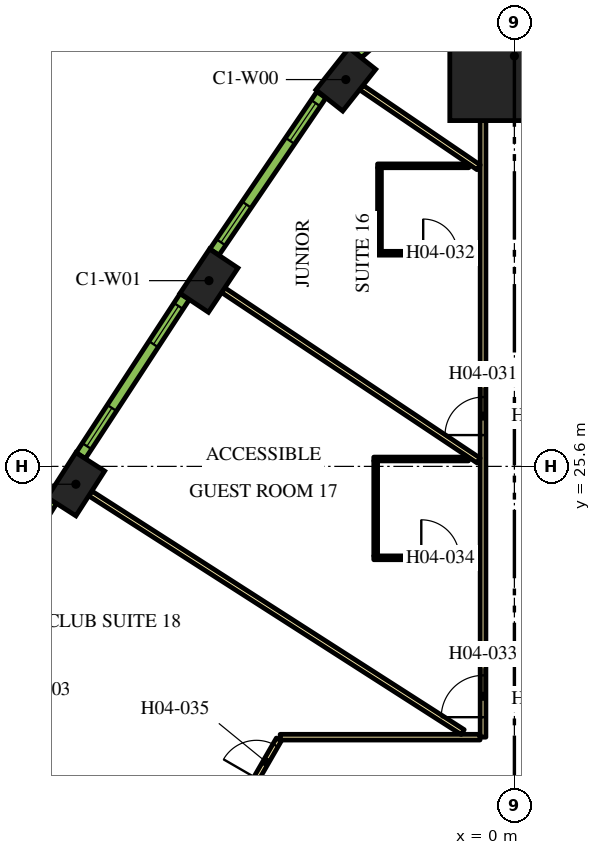
"""IFC4 building model, lengths in metres.
Left out: names, types, materials, properties, quantities, classifications, styles, units other than length and angle.
Written with IfcOpenShell. Run it as: python <this file> out.ifc"""

import sys

from ifc_helpers import new_model, si_unit, direction, frame, frame_2d, origin, origin_2d, place, context, subcontext, project, spatial, rectangle, extrude, element, fill, save


model = new_model("IFC4")
c1 = context("Model", 3, precision=1e-05, world=origin(), true_north=direction((0.0, 1.0)))
c2 = subcontext(c1, "Body", "Model", "MODEL_VIEW")
j1 = project(units=[si_unit("LENGTHUNIT", "METRE"), si_unit("PLANEANGLEUNIT", "RADIAN")], contexts=[c1])
p1 = place(None, origin())
s1 = spatial("IfcSite", under=j1, at=p1, CompositionType="ELEMENT")
p2 = place(p1, origin())
s2 = spatial("IfcBuilding", under=s1, at=p2, CompositionType="ELEMENT")
p3 = place(p2, frame((0.0, 0.0, 62.7)))
s3 = spatial("IfcBuildingStorey", under=s2, at=p3, CompositionType="ELEMENT", Elevation=62.7)
p4 = place(p3, frame((0.0, 36.399, 0.0), z_axis=(0.0, 0.0, 1.0), x_axis=(0.0, 1.0, 0.0)))
e1 = element("IfcColumn", 1, at=p4, inside=s3, PredefinedType="COLUMN", context=c2, shape_type="SweptSolid", body=[
    extrude(rectangle(XDim=3.4, YDim=3.4, at=origin_2d()), origin(), (0.0, 0.0, 1.0), 3.9),
])
for number, where, z_axis, x_axis in (
    (2, (-4.436, 35.778, 0.0), (0.0, 0.0, 1.0), (-0.62, -0.784, 0.0)),
    (3, (-8.037, 30.487, 0.0), (0.0, 0.0, 1.0), (-0.555, -0.832, 0.0)),
    (4, (-11.539, 25.131, 0.0), (0.0, 0.0, 1.0), (-0.539, -0.842, 0.0)),
):
    element("IfcColumn", number, at=place(p3, frame(where, z_axis=z_axis, x_axis=x_axis)), inside=s3, PredefinedType="COLUMN", context=c2, shape_type="SweptSolid", body=[
        extrude(rectangle(XDim=1.4, YDim=0.9, at=origin_2d()), origin(), (0.0, 0.0, 1.0), 3.9),
    ])
p5 = place(p3, frame((-0.825, 18.475, 0.0), z_axis=(0.0, 0.0, 1.0), x_axis=(0.0, 1.0, 0.0)))
e5 = element("IfcWall", 5, at=p5, inside=s3, PredefinedType="PARTITIONING", context=c2, shape_type="SweptSolid", body=[
    extrude(rectangle(XDim=16.224, YDim=0.15, at=frame_2d((8.112, 0.0))), origin(), (0.0, 0.0, 1.0), 2.75),
])
p6 = place(p5, frame((7.949, 0.0, 0.0)))
e6 = element("IfcOpeningElement", 6, at=p6, cuts=e5, PredefinedType="OPENING", context=c2, shape_type="SweptSolid", body=[
    extrude(rectangle(XDim=1.0, YDim=2.1, at=frame_2d((0.5, 1.05))), frame((0.0, 0.085, 0.0), z_axis=(0.0, -1.0, 0.0), x_axis=(1.0, 0.0, 0.0)), (0.0, 0.0, 1.0), 0.17),
])
p7 = place(p5, frame((0.526, 0.0, 0.0)))
e7 = element("IfcOpeningElement", 7, at=p7, cuts=e5, PredefinedType="OPENING", context=c2, shape_type="SweptSolid", body=[
    extrude(rectangle(XDim=1.1, YDim=2.1, at=frame_2d((0.55, 1.05))), frame((0.0, 0.085, 0.0), z_axis=(0.0, -1.0, 0.0), x_axis=(1.0, 0.0, 0.0)), (0.0, 0.0, 1.0), 0.17),
])
p8 = place(p3, frame((-6.163, 18.475, 0.0), z_axis=(0.0, 0.0, 1.0), x_axis=(1.0, 0.0, 0.0)))
e8 = element("IfcWall", 8, at=p8, inside=s3, PredefinedType="PARTITIONING", context=c2, shape_type="SweptSolid", body=[
    extrude(rectangle(XDim=5.258, YDim=0.15, at=frame_2d((2.629, 0.0))), origin(), (0.0, 0.0, 1.0), 2.75),
])
p9 = place(p3, frame((-19.081, -3.9, 0.0), z_axis=(0.0, 0.0, 1.0), x_axis=(0.499998313975, 0.866026377209, 0.0)))
e9 = element("IfcWall", 9, at=p9, inside=s3, PredefinedType="PARTITIONING", context=c2, shape_type="SweptSolid", body=[
    extrude(rectangle(XDim=25.766, YDim=0.15, at=frame_2d((12.883, 0.0))), origin(), (0.0, 0.0, 1.0), 2.75),
])
p10 = place(p9, frame((24.586, 0.0, 0.0)))
e10 = element("IfcOpeningElement", 10, at=p10, cuts=e9, PredefinedType="OPENING", context=c2, shape_type="SweptSolid", body=[
    extrude(rectangle(XDim=1.0, YDim=2.1, at=frame_2d((0.5, 1.05))), frame((0.0, 0.085, 0.0), z_axis=(0.0, -1.0, 0.0), x_axis=(1.0, 0.0, 0.0)), (0.0, 0.0, 1.0), 0.17),
])
p11 = place(p9, frame((9.948, 0.0, 0.0)))
e11 = element("IfcOpeningElement", 11, at=p11, cuts=e9, PredefinedType="OPENING", context=c2, shape_type="SweptSolid", body=[
    extrude(rectangle(XDim=1.0, YDim=2.1, at=frame_2d((0.5, 1.05))), frame((0.0, 0.085, 0.0), z_axis=(0.0, -1.0, 0.0), x_axis=(1.0, 0.0, 0.0)), (0.0, 0.0, 1.0), 0.17),
])
p12 = place(p9, frame((7.782, 0.0, 0.0)))
e12 = element("IfcOpeningElement", 12, at=p12, cuts=e9, PredefinedType="OPENING", context=c2, shape_type="SweptSolid", body=[
    extrude(rectangle(XDim=0.9, YDim=2.1, at=frame_2d((0.45, 1.05))), frame((0.0, 0.085, 0.0), z_axis=(0.0, -1.0, 0.0), x_axis=(1.0, 0.0, 0.0)), (0.0, 0.0, 1.0), 0.17),
])
p13 = place(p9, frame((4.658, 0.0, 0.0)))
e13 = element("IfcOpeningElement", 13, at=p13, cuts=e9, PredefinedType="OPENING", context=c2, shape_type="SweptSolid", body=[
    extrude(rectangle(XDim=0.9, YDim=2.1, at=frame_2d((0.45, 1.05))), frame((0.0, 0.085, 0.0), z_axis=(0.0, -1.0, 0.0), x_axis=(1.0, 0.0, 0.0)), (0.0, 0.0, 1.0), 0.17),
])
p14 = place(p3, frame((-11.16, 24.888, 0.0), z_axis=(0.0, 0.0, 1.0), x_axis=(0.84199813156, -0.539480441211, 0.0)))
e14 = element("IfcWall", 14, at=p14, inside=s3, PredefinedType="PARTITIONING", context=c2, shape_type="SweptSolid", body=[
    extrude(rectangle(XDim=11.638, YDim=0.15, at=frame_2d((5.819, 0.0))), origin(), (0.0, 0.0, 1.0), 2.75),
])
p15 = place(p3, frame((-7.662, 30.238, 0.0), z_axis=(0.0, 0.0, 1.0), x_axis=(0.831882886825, -0.554951225431, 0.0)))
e15 = element("IfcWall", 15, at=p15, inside=s3, PredefinedType="PARTITIONING", context=c2, shape_type="SweptSolid", body=[
    extrude(rectangle(XDim=8.079, YDim=0.15, at=frame_2d((4.04, 0.0))), origin(), (0.0, 0.0, 1.0), 2.75),
])
p16 = place(p3, frame((-4.028, 35.569, 0.0), z_axis=(0.0, 0.0, 1.0), x_axis=(0.826730622998, -0.562597971021, 0.0)))
e16 = element("IfcWall", 16, at=p16, inside=s3, PredefinedType="PARTITIONING", context=c2, shape_type="SweptSolid", body=[
    extrude(rectangle(XDim=3.733, YDim=0.15, at=frame_2d((1.867, 0.0))), origin(), (0.0, 0.0, 1.0), 2.75),
])
p17 = place(p3, frame((-3.6, 31.208, 0.0), z_axis=(0.0, 0.0, 1.0), x_axis=(1.0, 0.0, 0.0)))
e17 = element("IfcWall", 17, at=p17, inside=s3, PredefinedType="PARTITIONING", context=c2, shape_type="SweptSolid", body=[
    extrude(rectangle(XDim=2.7, YDim=0.1, at=frame_2d((1.35, 0.0))), origin(), (0.0, 0.0, 1.0), 2.75),
])
p18 = place(p17, frame((1.2, 0.0, 0.0)))
e18 = element("IfcOpeningElement", 18, at=p18, cuts=e17, PredefinedType="OPENING", context=c2, shape_type="SweptSolid", body=[
    extrude(rectangle(XDim=0.9, YDim=2.1, at=frame_2d((0.45, 1.05))), frame((0.0, 0.06, 0.0), z_axis=(0.0, -1.0, 0.0), x_axis=(1.0, 0.0, 0.0)), (0.0, 0.0, 1.0), 0.12),
])
p19 = place(p3, frame((-3.55, 31.259, 0.0), z_axis=(0.0, 0.0, 1.0), x_axis=(0.0, 1.0, 0.0)))
e19 = element("IfcWall", 19, at=p19, inside=s3, PredefinedType="PARTITIONING", context=c2, shape_type="SweptSolid", body=[
    extrude(rectangle(XDim=2.2, YDim=0.1, at=frame_2d((1.1, 0.0))), origin(), (0.0, 0.0, 1.0), 2.75),
])
p20 = place(p3, frame((-1.2, 33.509, 0.0), z_axis=(0.0, 0.0, 1.0), x_axis=(-1.0, 0.0, 0.0)))
e20 = element("IfcWall", 20, at=p20, inside=s3, PredefinedType="PARTITIONING", context=c2, shape_type="SweptSolid", body=[
    extrude(rectangle(XDim=2.4, YDim=0.1, at=frame_2d((1.2, 0.0))), origin(), (0.0, 0.0, 1.0), 2.75),
])
p21 = place(p3, frame((-3.7, 23.195, 0.0), z_axis=(0.0, 0.0, 1.0), x_axis=(1.0, 0.0, 0.0)))
e21 = element("IfcWall", 21, at=p21, inside=s3, PredefinedType="PARTITIONING", context=c2, shape_type="SweptSolid", body=[
    extrude(rectangle(XDim=2.8, YDim=0.1, at=frame_2d((1.4, 0.0))), origin(), (0.0, 0.0, 1.0), 2.75),
])
p22 = place(p21, frame((1.25, 0.0, 0.0)))
e22 = element("IfcOpeningElement", 22, at=p22, cuts=e21, PredefinedType="OPENING", context=c2, shape_type="SweptSolid", body=[
    extrude(rectangle(XDim=1.0, YDim=2.1, at=frame_2d((0.5, 1.05))), frame((0.0, 0.06, 0.0), z_axis=(0.0, -1.0, 0.0), x_axis=(1.0, 0.0, 0.0)), (0.0, 0.0, 1.0), 0.12),
])
p23 = place(p3, frame((-3.65, 23.245, 0.0), z_axis=(0.0, 0.0, 1.0), x_axis=(0.0, 1.0, 0.0)))
e23 = element("IfcWall", 23, at=p23, inside=s3, PredefinedType="PARTITIONING", context=c2, shape_type="SweptSolid", body=[
    extrude(rectangle(XDim=2.5, YDim=0.1, at=frame_2d((1.25, 0.0))), origin(), (0.0, 0.0, 1.0), 2.75),
])
p24 = place(p3, frame((-1.21, 25.795, 0.0), z_axis=(0.0, 0.0, 1.0), x_axis=(-1.0, 0.0, 0.0)))
e24 = element("IfcWall", 24, at=p24, inside=s3, PredefinedType="PARTITIONING", context=c2, shape_type="SweptSolid", body=[
    extrude(rectangle(XDim=2.49, YDim=0.1, at=frame_2d((1.245, 0.0))), origin(), (0.0, 0.0, 1.0), 2.75),
])
p25 = place(p3, frame((-3.064, 37.395, 0.0), z_axis=(0.0, 0.0, 1.0), x_axis=(-0.749812680302, -0.661650167731, 0.0)))
e25 = element("IfcWall", 25, at=p25, inside=s3, PredefinedType="SOLIDWALL", context=c2, shape_type="SweptSolid", body=[
    extrude(rectangle(XDim=1.415, YDim=0.29, at=frame_2d((0.708, 0.0))), origin(), (0.0, 0.0, 1.0), 3.65),
])
p26 = place(p25, frame((0.258, 0.0, 0.9)))
e26 = element("IfcOpeningElement", 26, at=p26, cuts=e25, PredefinedType="OPENING", context=c2, shape_type="SweptSolid", body=[
    extrude(rectangle(XDim=0.9, YDim=2.15, at=frame_2d((0.45, 1.075))), frame((0.0, 0.155, 0.0), z_axis=(0.0, -1.0, 0.0), x_axis=(1.0, 0.0, 0.0)), (0.0, 0.0, 1.0), 0.31),
])
p27 = place(p3, frame((-5.078, 35.376, 0.0), z_axis=(0.0, 0.0, 1.0), x_axis=(-0.562610153679, -0.826722332454, 0.0)))
e27 = element("IfcWall", 27, at=p27, inside=s3, PredefinedType="SOLIDWALL", context=c2, shape_type="SweptSolid", body=[
    extrude(rectangle(XDim=5.006, YDim=0.29, at=frame_2d((2.503, 0.0))), origin(), (0.0, 0.0, 1.0), 3.65),
])
p28 = place(p27, frame((0.265, 0.0, 0.9)))
e28 = element("IfcOpeningElement", 28, at=p28, cuts=e27, PredefinedType="OPENING", context=c2, shape_type="SweptSolid", body=[
    extrude(rectangle(XDim=1.2, YDim=2.15, at=frame_2d((0.6, 1.075))), frame((0.0, 0.155, 0.0), z_axis=(0.0, -1.0, 0.0), x_axis=(1.0, 0.0, 0.0)), (0.0, 0.0, 1.0), 0.31),
])
p29 = place(p27, frame((3.495, 0.0, 0.9)))
e29 = element("IfcOpeningElement", 29, at=p29, cuts=e27, PredefinedType="OPENING", context=c2, shape_type="SweptSolid", body=[
    extrude(rectangle(XDim=1.2, YDim=2.15, at=frame_2d((0.6, 1.075))), frame((0.0, 0.155, 0.0), z_axis=(0.0, -1.0, 0.0), x_axis=(1.0, 0.0, 0.0)), (0.0, 0.0, 1.0), 0.31),
])
p30 = place(p3, frame((-8.676, 30.068, 0.0), z_axis=(0.0, 0.0, 1.0), x_axis=(-0.547204617628, -0.836998868845, 0.0)))
e30 = element("IfcWall", 30, at=p30, inside=s3, PredefinedType="SOLIDWALL", context=c2, shape_type="SweptSolid", body=[
    extrude(rectangle(XDim=4.998, YDim=0.29, at=frame_2d((2.499, 0.0))), origin(), (0.0, 0.0, 1.0), 3.65),
])
p31 = place(p30, frame((0.297, 0.0, 0.9)))
e31 = element("IfcOpeningElement", 31, at=p31, cuts=e30, PredefinedType="OPENING", context=c2, shape_type="SweptSolid", body=[
    extrude(rectangle(XDim=1.2, YDim=2.15, at=frame_2d((0.6, 1.075))), frame((0.0, 0.155, 0.0), z_axis=(0.0, -1.0, 0.0), x_axis=(1.0, 0.0, 0.0)), (0.0, 0.0, 1.0), 0.31),
])
p32 = place(p30, frame((3.501, 0.0, 0.9)))
e32 = element("IfcOpeningElement", 32, at=p32, cuts=e30, PredefinedType="OPENING", context=c2, shape_type="SweptSolid", body=[
    extrude(rectangle(XDim=1.2, YDim=2.15, at=frame_2d((0.6, 1.075))), frame((0.0, 0.155, 0.0), z_axis=(0.0, -1.0, 0.0), x_axis=(1.0, 0.0, 0.0)), (0.0, 0.0, 1.0), 0.31),
])
p33 = place(p3, frame((-12.17, 24.699, 0.0), z_axis=(0.0, 0.0, 1.0), x_axis=(-0.531688286542, -0.846940119462, 0.0)))
e33 = element("IfcWall", 33, at=p33, inside=s3, PredefinedType="SOLIDWALL", context=c2, shape_type="SweptSolid", body=[
    extrude(rectangle(XDim=4.998, YDim=0.29, at=frame_2d((2.499, 0.0))), origin(), (0.0, 0.0, 1.0), 3.65),
])
p34 = place(p33, frame((0.297, 0.0, 0.9)))
e34 = element("IfcOpeningElement", 34, at=p34, cuts=e33, PredefinedType="OPENING", context=c2, shape_type="SweptSolid", body=[
    extrude(rectangle(XDim=1.2, YDim=2.15, at=frame_2d((0.6, 1.075))), frame((0.0, 0.155, 0.0), z_axis=(0.0, -1.0, 0.0), x_axis=(1.0, 0.0, 0.0)), (0.0, 0.0, 1.0), 0.31),
])
p35 = place(p33, frame((3.501, 0.0, 0.9)))
e35 = element("IfcOpeningElement", 35, at=p35, cuts=e33, PredefinedType="OPENING", context=c2, shape_type="SweptSolid", body=[
    extrude(rectangle(XDim=1.2, YDim=2.15, at=frame_2d((0.6, 1.075))), frame((0.0, 0.155, 0.0), z_axis=(0.0, -1.0, 0.0), x_axis=(1.0, 0.0, 0.0)), (0.0, 0.0, 1.0), 0.31),
])
p36 = place(p6, origin())
e36 = element("IfcDoor", 36, at=p36, inside=s3, OperationType="SINGLE_SWING_LEFT", PredefinedType="DOOR", context=c2, shape_type="SweptSolid", body=[
    extrude(rectangle(XDim=1.0, YDim=2.1, at=frame_2d((0.5, 1.05))), frame((0.0, 0.025, 0.0), z_axis=(0.0, -1.0, 0.0), x_axis=(1.0, 0.0, 0.0)), (0.0, 0.0, 1.0), 0.05),
])
fill(e6, e36)
p37 = place(p18, origin())
e37 = element("IfcDoor", 37, at=p37, inside=s3, OperationType="SINGLE_SWING_LEFT", PredefinedType="DOOR", context=c2, shape_type="SweptSolid", body=[
    extrude(rectangle(XDim=0.9, YDim=2.1, at=frame_2d((0.45, 1.05))), frame((0.0, 0.025, 0.0), z_axis=(0.0, -1.0, 0.0), x_axis=(1.0, 0.0, 0.0)), (0.0, 0.0, 1.0), 0.05),
])
fill(e18, e37)
p38 = place(p7, origin())
e38 = element("IfcDoor", 38, at=p38, inside=s3, OperationType="SINGLE_SWING_LEFT", PredefinedType="DOOR", context=c2, shape_type="SweptSolid", body=[
    extrude(rectangle(XDim=1.1, YDim=2.1, at=frame_2d((0.55, 1.05))), frame((0.0, 0.025, 0.0), z_axis=(0.0, -1.0, 0.0), x_axis=(1.0, 0.0, 0.0)), (0.0, 0.0, 1.0), 0.05),
])
fill(e7, e38)
p39 = place(p22, origin())
e39 = element("IfcDoor", 39, at=p39, inside=s3, OperationType="SINGLE_SWING_LEFT", PredefinedType="DOOR", context=c2, shape_type="SweptSolid", body=[
    extrude(rectangle(XDim=1.0, YDim=2.1, at=frame_2d((0.5, 1.05))), frame((0.0, 0.025, 0.0), z_axis=(0.0, -1.0, 0.0), x_axis=(1.0, 0.0, 0.0)), (0.0, 0.0, 1.0), 0.05),
])
fill(e22, e39)
p40 = place(p10, origin())
e40 = element("IfcDoor", 40, at=p40, inside=s3, OperationType="SINGLE_SWING_RIGHT", PredefinedType="DOOR", context=c2, shape_type="SweptSolid", body=[
    extrude(rectangle(XDim=1.0, YDim=2.1, at=frame_2d((0.5, 1.05))), frame((0.0, 0.025, 0.0), z_axis=(0.0, -1.0, 0.0), x_axis=(1.0, 0.0, 0.0)), (0.0, 0.0, 1.0), 0.05),
])
fill(e10, e40)
p41 = place(p28, origin())
e41 = element("IfcWindow", 41, at=p41, inside=s3, PartitioningType="DOUBLE_PANEL_VERTICAL", PredefinedType="WINDOW", context=c2, shape_type="SweptSolid", body=[
    extrude(rectangle(XDim=1.2, YDim=2.15, at=frame_2d((0.6, 1.075))), frame((0.0, 0.015, 0.0), z_axis=(0.0, -1.0, 0.0), x_axis=(1.0, 0.0, 0.0)), (0.0, 0.0, 1.0), 0.06),
])
fill(e28, e41)
p42 = place(p29, origin())
e42 = element("IfcWindow", 42, at=p42, inside=s3, PartitioningType="DOUBLE_PANEL_VERTICAL", PredefinedType="WINDOW", context=c2, shape_type="SweptSolid", body=[
    extrude(rectangle(XDim=1.2, YDim=2.15, at=frame_2d((0.6, 1.075))), frame((0.0, 0.015, 0.0), z_axis=(0.0, -1.0, 0.0), x_axis=(1.0, 0.0, 0.0)), (0.0, 0.0, 1.0), 0.06),
])
fill(e29, e42)
p43 = place(p31, origin())
e43 = element("IfcWindow", 43, at=p43, inside=s3, PartitioningType="DOUBLE_PANEL_VERTICAL", PredefinedType="WINDOW", context=c2, shape_type="SweptSolid", body=[
    extrude(rectangle(XDim=1.2, YDim=2.15, at=frame_2d((0.6, 1.075))), frame((0.0, 0.015, 0.0), z_axis=(0.0, -1.0, 0.0), x_axis=(1.0, 0.0, 0.0)), (0.0, 0.0, 1.0), 0.06),
])
fill(e31, e43)
p44 = place(p32, origin())
e44 = element("IfcWindow", 44, at=p44, inside=s3, PartitioningType="DOUBLE_PANEL_VERTICAL", PredefinedType="WINDOW", context=c2, shape_type="SweptSolid", body=[
    extrude(rectangle(XDim=1.2, YDim=2.15, at=frame_2d((0.6, 1.075))), frame((0.0, 0.015, 0.0), z_axis=(0.0, -1.0, 0.0), x_axis=(1.0, 0.0, 0.0)), (0.0, 0.0, 1.0), 0.06),
])
fill(e32, e44)
save(model, sys.argv[1])
